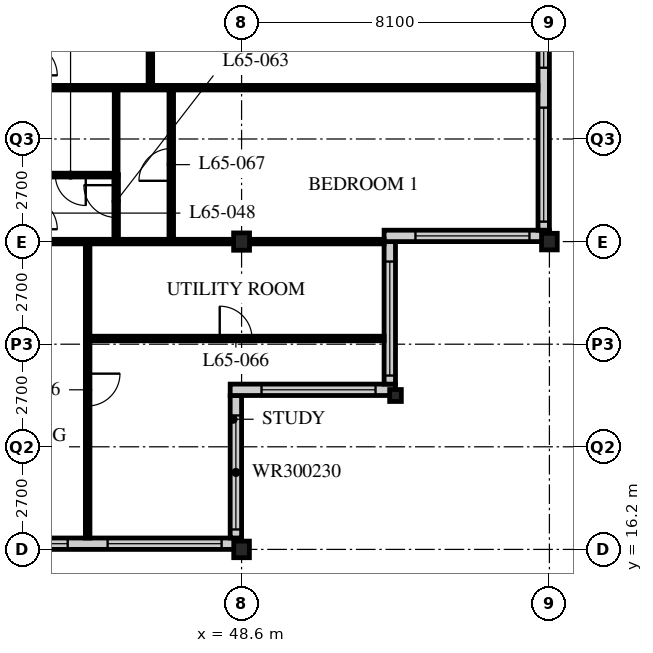
"""IFC4 building model, lengths in metres.
Left out: names, types, materials, properties, quantities, classifications, styles, units other than length and angle.
Written with IfcOpenShell. Run it as: python <this file> out.ifc"""

import sys

from ifc_helpers import new_model, si_unit, direction, frame, frame_2d, origin, origin_2d, place, context, subcontext, project, spatial, rectangle, i_section, extrude, element, fill, save


model = new_model("IFC4")
c1 = context("Model", 3, precision=1e-05, world=origin(), true_north=direction((0.0, 1.0)))
c2 = subcontext(c1, "Body", "Model", "MODEL_VIEW")
j1 = project(units=[si_unit("LENGTHUNIT", "METRE"), si_unit("PLANEANGLEUNIT", "RADIAN")], contexts=[c1])
p1 = place(None, origin())
s1 = spatial("IfcSite", under=j1, at=p1, CompositionType="ELEMENT")
p2 = place(p1, origin())
s2 = spatial("IfcBuilding", under=s1, at=p2, CompositionType="ELEMENT")
p3 = place(p2, frame((0.0, 0.0, 254.1)))
s3 = spatial("IfcBuildingStorey", under=s2, at=p3, CompositionType="ELEMENT", Elevation=254.1)
p4 = place(p3, frame((48.6, 16.2, 0.0), z_axis=(0.0, 0.0, 1.0), x_axis=(1.0, 0.0, 0.0)))
e1 = element("IfcColumn", 1, at=p4, inside=s3, PredefinedType="COLUMN", context=c2, shape_type="SweptSolid", body=[
    extrude(i_section(OverallWidth=0.412, OverallDepth=0.437, WebThickness=0.036, FlangeThickness=0.058, FilletRadius=0.015, at=origin_2d()), origin(), (0.0, 0.0, 1.0), 3.9),
])
p5 = place(p3, frame((48.6, 24.3, 0.0), z_axis=(0.0, 0.0, 1.0), x_axis=(1.0, 0.0, 0.0)))
e2 = element("IfcColumn", 2, at=p5, inside=s3, PredefinedType="COLUMN", context=c2, shape_type="SweptSolid", body=[
    extrude(i_section(OverallWidth=0.418, OverallDepth=0.456, WebThickness=0.042, FlangeThickness=0.067, FilletRadius=0.015, at=origin_2d()), origin(), (0.0, 0.0, 1.0), 3.9),
])
p6 = place(p3, frame((52.65, 20.25, 0.0), z_axis=(0.0, 0.0, 1.0), x_axis=(1.0, 0.0, 0.0)))
e3 = element("IfcColumn", 3, at=p6, inside=s3, PredefinedType="COLUMN", context=c2, shape_type="SweptSolid", body=[
    extrude(i_section(OverallWidth=0.307, OverallDepth=0.314, WebThickness=0.012, FlangeThickness=0.019, FilletRadius=0.015, at=origin_2d()), origin(), (0.0, 0.0, 1.0), 3.9),
])
p7 = place(p3, frame((56.7, 24.3, 0.0), z_axis=(0.0, 0.0, 1.0), x_axis=(1.0, 0.0, 0.0)))
e4 = element("IfcColumn", 4, at=p7, inside=s3, PredefinedType="COLUMN", context=c2, shape_type="SweptSolid", body=[
    extrude(i_section(OverallWidth=0.412, OverallDepth=0.437, WebThickness=0.036, FlangeThickness=0.058, FilletRadius=0.015, at=origin_2d()), origin(), (0.0, 0.0, 1.0), 3.9),
])
p8 = place(p3, frame((8.4, 16.35, 0.0), z_axis=(0.0, 0.0, 1.0), x_axis=(1.0, 0.0, 0.0)))
e5 = element("IfcWall", 5, at=p8, inside=s3, PredefinedType="SOLIDWALL", context=c2, shape_type="SweptSolid", body=[
    extrude(rectangle(XDim=40.2, YDim=0.3, at=frame_2d((20.1, 0.0))), origin(), (0.0, 0.0, 1.0), 3.69),
])
p9 = place(p8, frame((0.225, 0.0, 0.6)))
e6 = element("IfcOpeningElement", 6, at=p9, cuts=e5, PredefinedType="OPENING", context=c2, shape_type="SweptSolid", body=[
    extrude(rectangle(XDim=3.0, YDim=2.4, at=frame_2d((1.5, 1.2))), frame((0.0, 0.16, 0.0), z_axis=(0.0, -1.0, 0.0), x_axis=(1.0, 0.0, 0.0)), (0.0, 0.0, 1.0), 0.32),
])
p10 = place(p8, frame((4.275, 0.0, 0.6)))
e7 = element("IfcOpeningElement", 7, at=p10, cuts=e5, PredefinedType="OPENING", context=c2, shape_type="SweptSolid", body=[
    extrude(rectangle(XDim=3.0, YDim=2.4, at=frame_2d((1.5, 1.2))), frame((0.0, 0.16, 0.0), z_axis=(0.0, -1.0, 0.0), x_axis=(1.0, 0.0, 0.0)), (0.0, 0.0, 1.0), 0.32),
])
p11 = place(p8, frame((8.325, 0.0, 0.6)))
e8 = element("IfcOpeningElement", 8, at=p11, cuts=e5, PredefinedType="OPENING", context=c2, shape_type="SweptSolid", body=[
    extrude(rectangle(XDim=3.0, YDim=2.4, at=frame_2d((1.5, 1.2))), frame((0.0, 0.16, 0.0), z_axis=(0.0, -1.0, 0.0), x_axis=(1.0, 0.0, 0.0)), (0.0, 0.0, 1.0), 0.32),
])
p12 = place(p8, frame((12.375, 0.0, 0.6)))
e9 = element("IfcOpeningElement", 9, at=p12, cuts=e5, PredefinedType="OPENING", context=c2, shape_type="SweptSolid", body=[
    extrude(rectangle(XDim=3.0, YDim=2.4, at=frame_2d((1.5, 1.2))), frame((0.0, 0.16, 0.0), z_axis=(0.0, -1.0, 0.0), x_axis=(1.0, 0.0, 0.0)), (0.0, 0.0, 1.0), 0.32),
])
p13 = place(p8, frame((16.425, 0.0, 0.6)))
e10 = element("IfcOpeningElement", 10, at=p13, cuts=e5, PredefinedType="OPENING", context=c2, shape_type="SweptSolid", body=[
    extrude(rectangle(XDim=3.0, YDim=2.4, at=frame_2d((1.5, 1.2))), frame((0.0, 0.16, 0.0), z_axis=(0.0, -1.0, 0.0), x_axis=(1.0, 0.0, 0.0)), (0.0, 0.0, 1.0), 0.32),
])
p14 = place(p8, frame((20.475, 0.0, 0.6)))
e11 = element("IfcOpeningElement", 11, at=p14, cuts=e5, PredefinedType="OPENING", context=c2, shape_type="SweptSolid", body=[
    extrude(rectangle(XDim=3.0, YDim=2.4, at=frame_2d((1.5, 1.2))), frame((0.0, 0.16, 0.0), z_axis=(0.0, -1.0, 0.0), x_axis=(1.0, 0.0, 0.0)), (0.0, 0.0, 1.0), 0.32),
])
p15 = place(p8, frame((24.525, 0.0, 0.6)))
e12 = element("IfcOpeningElement", 12, at=p15, cuts=e5, PredefinedType="OPENING", context=c2, shape_type="SweptSolid", body=[
    extrude(rectangle(XDim=3.0, YDim=2.4, at=frame_2d((1.5, 1.2))), frame((0.0, 0.16, 0.0), z_axis=(0.0, -1.0, 0.0), x_axis=(1.0, 0.0, 0.0)), (0.0, 0.0, 1.0), 0.32),
])
p16 = place(p8, frame((28.575, 0.0, 0.6)))
e13 = element("IfcOpeningElement", 13, at=p16, cuts=e5, PredefinedType="OPENING", context=c2, shape_type="SweptSolid", body=[
    extrude(rectangle(XDim=3.0, YDim=2.4, at=frame_2d((1.5, 1.2))), frame((0.0, 0.16, 0.0), z_axis=(0.0, -1.0, 0.0), x_axis=(1.0, 0.0, 0.0)), (0.0, 0.0, 1.0), 0.32),
])
p17 = place(p8, frame((32.625, 0.0, 0.6)))
e14 = element("IfcOpeningElement", 14, at=p17, cuts=e5, PredefinedType="OPENING", context=c2, shape_type="SweptSolid", body=[
    extrude(rectangle(XDim=3.0, YDim=2.4, at=frame_2d((1.5, 1.2))), frame((0.0, 0.16, 0.0), z_axis=(0.0, -1.0, 0.0), x_axis=(1.0, 0.0, 0.0)), (0.0, 0.0, 1.0), 0.32),
])
p18 = place(p8, frame((36.675, 0.0, 0.6)))
e15 = element("IfcOpeningElement", 15, at=p18, cuts=e5, PredefinedType="OPENING", context=c2, shape_type="SweptSolid", body=[
    extrude(rectangle(XDim=3.0, YDim=2.4, at=frame_2d((1.5, 1.2))), frame((0.0, 0.16, 0.0), z_axis=(0.0, -1.0, 0.0), x_axis=(1.0, 0.0, 0.0)), (0.0, 0.0, 1.0), 0.32),
])
p19 = place(p3, frame((48.45, 16.5, 0.0), z_axis=(0.0, 0.0, 1.0), x_axis=(0.0, 1.0, 0.0)))
e16 = element("IfcWall", 16, at=p19, inside=s3, PredefinedType="SOLIDWALL", context=c2, shape_type="SweptSolid", body=[
    extrude(rectangle(XDim=3.75, YDim=0.3, at=frame_2d((1.875, 0.0))), origin(), (0.0, 0.0, 1.0), 3.69),
])
p20 = place(p19, frame((0.225, 0.0, 0.6)))
e17 = element("IfcOpeningElement", 17, at=p20, cuts=e16, PredefinedType="OPENING", context=c2, shape_type="SweptSolid", body=[
    extrude(rectangle(XDim=3.0, YDim=2.3, at=frame_2d((1.5, 1.15))), frame((0.0, 0.16, 0.0), z_axis=(0.0, -1.0, 0.0), x_axis=(1.0, 0.0, 0.0)), (0.0, 0.0, 1.0), 0.32),
])
p21 = place(p3, frame((48.3, 20.4, 0.0), z_axis=(0.0, 0.0, 1.0), x_axis=(1.0, 0.0, 0.0)))
e18 = element("IfcWall", 18, at=p21, inside=s3, PredefinedType="SOLIDWALL", context=c2, shape_type="SweptSolid", body=[
    extrude(rectangle(XDim=4.35, YDim=0.3, at=frame_2d((2.175, 0.0))), origin(), (0.0, 0.0, 1.0), 3.69),
])
p22 = place(p21, frame((0.825, 0.0, 0.6)))
e19 = element("IfcOpeningElement", 19, at=p22, cuts=e18, PredefinedType="OPENING", context=c2, shape_type="SweptSolid", body=[
    extrude(rectangle(XDim=3.0, YDim=2.3, at=frame_2d((1.5, 1.15))), frame((0.0, 0.16, 0.0), z_axis=(0.0, -1.0, 0.0), x_axis=(1.0, 0.0, 0.0)), (0.0, 0.0, 1.0), 0.32),
])
p23 = place(p3, frame((52.5, 20.55, 0.0), z_axis=(0.0, 0.0, 1.0), x_axis=(0.0, 1.0, 0.0)))
e20 = element("IfcWall", 20, at=p23, inside=s3, PredefinedType="SOLIDWALL", context=c2, shape_type="SweptSolid", body=[
    extrude(rectangle(XDim=3.75, YDim=0.3, at=frame_2d((1.875, 0.0))), origin(), (0.0, 0.0, 1.0), 3.69),
])
p24 = place(p23, frame((0.225, 0.0, 0.6)))
e21 = element("IfcOpeningElement", 21, at=p24, cuts=e20, PredefinedType="OPENING", context=c2, shape_type="SweptSolid", body=[
    extrude(rectangle(XDim=3.0, YDim=2.3, at=frame_2d((1.5, 1.15))), frame((0.0, 0.16, 0.0), z_axis=(0.0, -1.0, 0.0), x_axis=(1.0, 0.0, 0.0)), (0.0, 0.0, 1.0), 0.32),
])
p25 = place(p3, frame((52.35, 24.45, 0.0), z_axis=(0.0, 0.0, 1.0), x_axis=(1.0, 0.0, 0.0)))
e22 = element("IfcWall", 22, at=p25, inside=s3, PredefinedType="SOLIDWALL", context=c2, shape_type="SweptSolid", body=[
    extrude(rectangle(XDim=4.35, YDim=0.3, at=frame_2d((2.175, 0.0))), origin(), (0.0, 0.0, 1.0), 3.69),
])
p26 = place(p25, frame((0.825, 0.0, 0.6)))
e23 = element("IfcOpeningElement", 23, at=p26, cuts=e22, PredefinedType="OPENING", context=c2, shape_type="SweptSolid", body=[
    extrude(rectangle(XDim=3.0, YDim=2.3, at=frame_2d((1.5, 1.15))), frame((0.0, 0.16, 0.0), z_axis=(0.0, -1.0, 0.0), x_axis=(1.0, 0.0, 0.0)), (0.0, 0.0, 1.0), 0.32),
])
p27 = place(p3, frame((56.55, 24.6, 0.0), z_axis=(0.0, 0.0, 1.0), x_axis=(0.0, 1.0, 0.0)))
e24 = element("IfcWall", 24, at=p27, inside=s3, PredefinedType="SOLIDWALL", context=c2, shape_type="SweptSolid", body=[
    extrude(rectangle(XDim=32.1, YDim=0.3, at=frame_2d((16.05, 0.0))), origin(), (0.0, 0.0, 1.0), 3.69),
])
p28 = place(p27, frame((0.225, 0.0, 0.6)))
e25 = element("IfcOpeningElement", 25, at=p28, cuts=e24, PredefinedType="OPENING", context=c2, shape_type="SweptSolid", body=[
    extrude(rectangle(XDim=3.0, YDim=2.4, at=frame_2d((1.5, 1.2))), frame((0.0, 0.16, 0.0), z_axis=(0.0, -1.0, 0.0), x_axis=(1.0, 0.0, 0.0)), (0.0, 0.0, 1.0), 0.32),
])
p29 = place(p27, frame((4.275, 0.0, 0.6)))
e26 = element("IfcOpeningElement", 26, at=p29, cuts=e24, PredefinedType="OPENING", context=c2, shape_type="SweptSolid", body=[
    extrude(rectangle(XDim=3.0, YDim=2.4, at=frame_2d((1.5, 1.2))), frame((0.0, 0.16, 0.0), z_axis=(0.0, -1.0, 0.0), x_axis=(1.0, 0.0, 0.0)), (0.0, 0.0, 1.0), 0.32),
])
p30 = place(p27, frame((8.325, 0.0, 0.6)))
e27 = element("IfcOpeningElement", 27, at=p30, cuts=e24, PredefinedType="OPENING", context=c2, shape_type="SweptSolid", body=[
    extrude(rectangle(XDim=3.0, YDim=2.4, at=frame_2d((1.5, 1.2))), frame((0.0, 0.16, 0.0), z_axis=(0.0, -1.0, 0.0), x_axis=(1.0, 0.0, 0.0)), (0.0, 0.0, 1.0), 0.32),
])
p31 = place(p27, frame((12.375, 0.0, 0.6)))
e28 = element("IfcOpeningElement", 28, at=p31, cuts=e24, PredefinedType="OPENING", context=c2, shape_type="SweptSolid", body=[
    extrude(rectangle(XDim=3.0, YDim=2.4, at=frame_2d((1.5, 1.2))), frame((0.0, 0.16, 0.0), z_axis=(0.0, -1.0, 0.0), x_axis=(1.0, 0.0, 0.0)), (0.0, 0.0, 1.0), 0.32),
])
p32 = place(p27, frame((16.425, 0.0, 0.6)))
e29 = element("IfcOpeningElement", 29, at=p32, cuts=e24, PredefinedType="OPENING", context=c2, shape_type="SweptSolid", body=[
    extrude(rectangle(XDim=3.0, YDim=2.4, at=frame_2d((1.5, 1.2))), frame((0.0, 0.16, 0.0), z_axis=(0.0, -1.0, 0.0), x_axis=(1.0, 0.0, 0.0)), (0.0, 0.0, 1.0), 0.32),
])
p33 = place(p27, frame((20.475, 0.0, 0.6)))
e30 = element("IfcOpeningElement", 30, at=p33, cuts=e24, PredefinedType="OPENING", context=c2, shape_type="SweptSolid", body=[
    extrude(rectangle(XDim=3.0, YDim=2.4, at=frame_2d((1.5, 1.2))), frame((0.0, 0.16, 0.0), z_axis=(0.0, -1.0, 0.0), x_axis=(1.0, 0.0, 0.0)), (0.0, 0.0, 1.0), 0.32),
])
p34 = place(p27, frame((24.525, 0.0, 0.6)))
e31 = element("IfcOpeningElement", 31, at=p34, cuts=e24, PredefinedType="OPENING", context=c2, shape_type="SweptSolid", body=[
    extrude(rectangle(XDim=3.0, YDim=2.4, at=frame_2d((1.5, 1.2))), frame((0.0, 0.16, 0.0), z_axis=(0.0, -1.0, 0.0), x_axis=(1.0, 0.0, 0.0)), (0.0, 0.0, 1.0), 0.32),
])
p35 = place(p27, frame((28.575, 0.0, 0.6)))
e32 = element("IfcOpeningElement", 32, at=p35, cuts=e24, PredefinedType="OPENING", context=c2, shape_type="SweptSolid", body=[
    extrude(rectangle(XDim=3.0, YDim=2.4, at=frame_2d((1.5, 1.2))), frame((0.0, 0.16, 0.0), z_axis=(0.0, -1.0, 0.0), x_axis=(1.0, 0.0, 0.0)), (0.0, 0.0, 1.0), 0.32),
])
p36 = place(p3, frame((42.9, 24.3, 0.0), z_axis=(0.0, 0.0, 1.0), x_axis=(1.0, 0.0, 0.0)))
e33 = element("IfcWall", 33, at=p36, inside=s3, PredefinedType="PARTITIONING", context=c2, shape_type="SweptSolid", body=[
    extrude(rectangle(XDim=9.45, YDim=0.12, at=frame_2d((4.725, 0.0))), origin(), (0.0, 0.0, 1.0), 3.078),
])
p37 = place(p3, frame((44.55, 16.5, 0.0), z_axis=(0.0, 0.0, 1.0), x_axis=(0.0, 1.0, 0.0)))
e34 = element("IfcWall", 34, at=p37, inside=s3, PredefinedType="PARTITIONING", context=c2, shape_type="SweptSolid", body=[
    extrude(rectangle(XDim=7.8, YDim=0.12, at=frame_2d((3.9, 0.0))), origin(), (0.0, 0.0, 1.0), 3.69),
])
p38 = place(p37, frame((3.475, 0.0, 0.0)))
e35 = element("IfcOpeningElement", 35, at=p38, cuts=e34, PredefinedType="OPENING", context=c2, shape_type="SweptSolid", body=[
    extrude(rectangle(XDim=0.85, YDim=2.1, at=frame_2d((0.425, 1.05))), frame((0.0, 0.07, 0.0), z_axis=(0.0, -1.0, 0.0), x_axis=(1.0, 0.0, 0.0)), (0.0, 0.0, 1.0), 0.14),
])
p39 = place(p3, frame((42.9, 26.05, 0.0), z_axis=(0.0, 0.0, 1.0), x_axis=(1.0, 0.0, 0.0)))
e36 = element("IfcWall", 36, at=p39, inside=s3, PredefinedType="PARTITIONING", context=c2, shape_type="SweptSolid", body=[
    extrude(rectangle(XDim=2.4, YDim=0.1, at=frame_2d((1.2, 0.0))), origin(), (0.0, 0.0, 1.0), 3.69),
])
p40 = place(p39, frame((0.8, 0.0, 0.0)))
e37 = element("IfcOpeningElement", 37, at=p40, cuts=e36, PredefinedType="OPENING", context=c2, shape_type="SweptSolid", body=[
    extrude(rectangle(XDim=0.8, YDim=2.1, at=frame_2d((0.4, 1.05))), frame((0.0, 0.06, 0.0), z_axis=(0.0, -1.0, 0.0), x_axis=(1.0, 0.0, 0.0)), (0.0, 0.0, 1.0), 0.12),
])
p41 = place(p3, frame((45.3, 26.05, 0.0), z_axis=(0.0, 0.0, 1.0), x_axis=(0.0, 1.0, 0.0)))
e38 = element("IfcWall", 38, at=p41, inside=s3, PredefinedType="PARTITIONING", context=c2, shape_type="SweptSolid", body=[
    extrude(rectangle(XDim=2.3, YDim=0.1, at=frame_2d((1.15, 0.0))), origin(), (0.0, 0.0, 1.0), 3.69),
])
p42 = place(p3, frame((42.9, 28.35, 0.0), z_axis=(0.0, 0.0, 1.0), x_axis=(1.0, 0.0, 0.0)))
e39 = element("IfcWall", 39, at=p42, inside=s3, PredefinedType="PARTITIONING", context=c2, shape_type="SweptSolid", body=[
    extrude(rectangle(XDim=13.5, YDim=0.12, at=frame_2d((6.75, 0.0))), origin(), (0.0, 0.0, 1.0), 3.69),
])
p43 = place(p3, frame((45.3, 24.3, 0.0), z_axis=(0.0, 0.0, 1.0), x_axis=(0.0, 1.0, 0.0)))
e40 = element("IfcWall", 40, at=p43, inside=s3, PredefinedType="PARTITIONING", context=c2, shape_type="SweptSolid", body=[
    extrude(rectangle(XDim=1.76, YDim=0.12, at=frame_2d((0.88, 0.0))), origin(), (0.0, 0.0, 1.0), 3.69),
])
p44 = place(p43, frame((0.635, 0.0, 0.0)))
e41 = element("IfcOpeningElement", 41, at=p44, cuts=e40, PredefinedType="OPENING", context=c2, shape_type="SweptSolid", body=[
    extrude(rectangle(XDim=0.85, YDim=2.1, at=frame_2d((0.425, 1.05))), frame((0.0, 0.07, 0.0), z_axis=(0.0, -1.0, 0.0), x_axis=(1.0, 0.0, 0.0)), (0.0, 0.0, 1.0), 0.14),
])
p45 = place(p3, frame((44.55, 21.75, 0.0), z_axis=(0.0, 0.0, 1.0), x_axis=(1.0, 0.0, 0.0)))
e42 = element("IfcWall", 42, at=p45, inside=s3, PredefinedType="PARTITIONING", context=c2, shape_type="SweptSolid", body=[
    extrude(rectangle(XDim=7.8, YDim=0.12, at=frame_2d((3.9, 0.0))), origin(), (0.0, 0.0, 1.0), 3.69),
])
p46 = place(p45, frame((3.475, 0.0, 0.0)))
e43 = element("IfcOpeningElement", 43, at=p46, cuts=e42, PredefinedType="OPENING", context=c2, shape_type="SweptSolid", body=[
    extrude(rectangle(XDim=0.85, YDim=2.1, at=frame_2d((0.425, 1.05))), frame((0.0, 0.07, 0.0), z_axis=(0.0, -1.0, 0.0), x_axis=(1.0, 0.0, 0.0)), (0.0, 0.0, 1.0), 0.14),
])
p47 = place(p3, frame((46.75, 24.3, 0.0), z_axis=(0.0, 0.0, 1.0), x_axis=(0.0, 1.0, 0.0)))
e44 = element("IfcWall", 44, at=p47, inside=s3, PredefinedType="PARTITIONING", context=c2, shape_type="SweptSolid", body=[
    extrude(rectangle(XDim=4.05, YDim=0.12, at=frame_2d((2.025, 0.0))), origin(), (0.0, 0.0, 1.0), 3.69),
])
p48 = place(p47, frame((1.6, 0.0, 0.0)))
e45 = element("IfcOpeningElement", 45, at=p48, cuts=e44, PredefinedType="OPENING", context=c2, shape_type="SweptSolid", body=[
    extrude(rectangle(XDim=0.85, YDim=2.1, at=frame_2d((0.425, 1.05))), frame((0.0, 0.07, 0.0), z_axis=(0.0, -1.0, 0.0), x_axis=(1.0, 0.0, 0.0)), (0.0, 0.0, 1.0), 0.14),
])
p49 = place(p3, frame((46.2, 28.35, 0.0), z_axis=(0.0, 0.0, 1.0), x_axis=(0.0, 1.0, 0.0)))
e46 = element("IfcWall", 46, at=p49, inside=s3, PredefinedType="PARTITIONING", context=c2, shape_type="SweptSolid", body=[
    extrude(rectangle(XDim=16.2, YDim=0.12, at=frame_2d((8.1, 0.0))), origin(), (0.0, 0.0, 1.0), 3.69),
])
p50 = place(p49, frame((1.6, 0.0, 0.0)))
e47 = element("IfcOpeningElement", 47, at=p50, cuts=e46, PredefinedType="OPENING", context=c2, shape_type="SweptSolid", body=[
    extrude(rectangle(XDim=0.85, YDim=2.1, at=frame_2d((0.425, 1.05))), frame((0.0, 0.07, 0.0), z_axis=(0.0, -1.0, 0.0), x_axis=(1.0, 0.0, 0.0)), (0.0, 0.0, 1.0), 0.14),
])
p51 = place(p49, frame((5.65, 0.0, 0.0)))
e48 = element("IfcOpeningElement", 48, at=p51, cuts=e46, PredefinedType="OPENING", context=c2, shape_type="SweptSolid", body=[
    extrude(rectangle(XDim=0.85, YDim=2.1, at=frame_2d((0.425, 1.05))), frame((0.0, 0.07, 0.0), z_axis=(0.0, -1.0, 0.0), x_axis=(1.0, 0.0, 0.0)), (0.0, 0.0, 1.0), 0.14),
])
p52 = place(p49, frame((13.75, 0.0, 0.0)))
e49 = element("IfcOpeningElement", 49, at=p52, cuts=e46, PredefinedType="OPENING", context=c2, shape_type="SweptSolid", body=[
    extrude(rectangle(XDim=0.85, YDim=2.1, at=frame_2d((0.425, 1.05))), frame((0.0, 0.07, 0.0), z_axis=(0.0, -1.0, 0.0), x_axis=(1.0, 0.0, 0.0)), (0.0, 0.0, 1.0), 0.14),
])
p53 = place(p49, frame((9.7, 0.0, 0.0)))
e50 = element("IfcOpeningElement", 50, at=p53, cuts=e46, PredefinedType="OPENING", context=c2, shape_type="SweptSolid", body=[
    extrude(rectangle(XDim=0.85, YDim=2.1, at=frame_2d((0.425, 1.05))), frame((0.0, 0.07, 0.0), z_axis=(0.0, -1.0, 0.0), x_axis=(1.0, 0.0, 0.0)), (0.0, 0.0, 1.0), 0.14),
])
p54 = place(p17, origin())
e51 = element("IfcWindow", 51, at=p54, inside=s3, PartitioningType="SINGLE_PANEL", PredefinedType="WINDOW", context=c2, shape_type="SweptSolid", body=[
    extrude(rectangle(XDim=3.0, YDim=2.4, at=frame_2d((1.5, 1.2))), frame((0.0, 0.03, 0.0), z_axis=(0.0, -1.0, 0.0), x_axis=(1.0, 0.0, 0.0)), (0.0, 0.0, 1.0), 0.06),
])
fill(e14, e51)
p55 = place(p18, origin())
e52 = element("IfcWindow", 52, at=p55, inside=s3, PartitioningType="SINGLE_PANEL", PredefinedType="WINDOW", context=c2, shape_type="SweptSolid", body=[
    extrude(rectangle(XDim=3.0, YDim=2.4, at=frame_2d((1.5, 1.2))), frame((0.0, 0.03, 0.0), z_axis=(0.0, -1.0, 0.0), x_axis=(1.0, 0.0, 0.0)), (0.0, 0.0, 1.0), 0.06),
])
fill(e15, e52)
p56 = place(p20, origin())
e53 = element("IfcWindow", 53, at=p56, inside=s3, PartitioningType="SINGLE_PANEL", PredefinedType="WINDOW", context=c2, shape_type="SweptSolid", body=[
    extrude(rectangle(XDim=3.0, YDim=2.3, at=frame_2d((1.5, 1.15))), frame((0.0, 0.03, 0.0), z_axis=(0.0, -1.0, 0.0), x_axis=(1.0, 0.0, 0.0)), (0.0, 0.0, 1.0), 0.06),
])
fill(e17, e53)
p57 = place(p22, origin())
e54 = element("IfcWindow", 54, at=p57, inside=s3, PartitioningType="SINGLE_PANEL", PredefinedType="WINDOW", context=c2, shape_type="SweptSolid", body=[
    extrude(rectangle(XDim=3.0, YDim=2.3, at=frame_2d((1.5, 1.15))), frame((0.0, 0.03, 0.0), z_axis=(0.0, -1.0, 0.0), x_axis=(1.0, 0.0, 0.0)), (0.0, 0.0, 1.0), 0.06),
])
fill(e19, e54)
p58 = place(p24, origin())
e55 = element("IfcWindow", 55, at=p58, inside=s3, PartitioningType="SINGLE_PANEL", PredefinedType="WINDOW", context=c2, shape_type="SweptSolid", body=[
    extrude(rectangle(XDim=3.0, YDim=2.3, at=frame_2d((1.5, 1.15))), frame((0.0, 0.03, 0.0), z_axis=(0.0, -1.0, 0.0), x_axis=(1.0, 0.0, 0.0)), (0.0, 0.0, 1.0), 0.06),
])
fill(e21, e55)
p59 = place(p26, origin())
e56 = element("IfcWindow", 56, at=p59, inside=s3, PartitioningType="SINGLE_PANEL", PredefinedType="WINDOW", context=c2, shape_type="SweptSolid", body=[
    extrude(rectangle(XDim=3.0, YDim=2.3, at=frame_2d((1.5, 1.15))), frame((0.0, 0.03, 0.0), z_axis=(0.0, -1.0, 0.0), x_axis=(1.0, 0.0, 0.0)), (0.0, 0.0, 1.0), 0.06),
])
fill(e23, e56)
p60 = place(p28, origin())
e57 = element("IfcWindow", 57, at=p60, inside=s3, PartitioningType="SINGLE_PANEL", PredefinedType="WINDOW", context=c2, shape_type="SweptSolid", body=[
    extrude(rectangle(XDim=3.0, YDim=2.4, at=frame_2d((1.5, 1.2))), frame((0.0, 0.03, 0.0), z_axis=(0.0, -1.0, 0.0), x_axis=(1.0, 0.0, 0.0)), (0.0, 0.0, 1.0), 0.06),
])
fill(e25, e57)
p61 = place(p29, origin())
e58 = element("IfcWindow", 58, at=p61, inside=s3, PartitioningType="SINGLE_PANEL", PredefinedType="WINDOW", context=c2, shape_type="SweptSolid", body=[
    extrude(rectangle(XDim=3.0, YDim=2.4, at=frame_2d((1.5, 1.2))), frame((0.0, 0.03, 0.0), z_axis=(0.0, -1.0, 0.0), x_axis=(1.0, 0.0, 0.0)), (0.0, 0.0, 1.0), 0.06),
])
fill(e26, e58)
p62 = place(p38, origin())
e59 = element("IfcDoor", 59, at=p62, inside=s3, OperationType="SINGLE_SWING_LEFT", PredefinedType="DOOR", context=c2, shape_type="SweptSolid", body=[
    extrude(rectangle(XDim=0.85, YDim=2.1, at=frame_2d((0.425, 1.05))), frame((0.0, 0.025, 0.0), z_axis=(0.0, -1.0, 0.0), x_axis=(1.0, 0.0, 0.0)), (0.0, 0.0, 1.0), 0.05),
])
fill(e35, e59)
p63 = place(p40, origin())
e60 = element("IfcDoor", 60, at=p63, inside=s3, OperationType="SINGLE_SWING_LEFT", PredefinedType="DOOR", context=c2, shape_type="SweptSolid", body=[
    extrude(rectangle(XDim=0.8, YDim=2.1, at=frame_2d((0.4, 1.05))), frame((0.0, 0.025, 0.0), z_axis=(0.0, -1.0, 0.0), x_axis=(1.0, 0.0, 0.0)), (0.0, 0.0, 1.0), 0.05),
])
fill(e37, e60)
p64 = place(p44, origin())
e61 = element("IfcDoor", 61, at=p64, inside=s3, OperationType="SINGLE_SWING_RIGHT", PredefinedType="DOOR", context=c2, shape_type="SweptSolid", body=[
    extrude(rectangle(XDim=0.85, YDim=2.1, at=frame_2d((0.425, 1.05))), frame((0.0, 0.025, 0.0), z_axis=(0.0, -1.0, 0.0), x_axis=(1.0, 0.0, 0.0)), (0.0, 0.0, 1.0), 0.05),
])
fill(e41, e61)
p65 = place(p46, origin())
e62 = element("IfcDoor", 62, at=p65, inside=s3, OperationType="SINGLE_SWING_LEFT", PredefinedType="DOOR", context=c2, shape_type="SweptSolid", body=[
    extrude(rectangle(XDim=0.85, YDim=2.1, at=frame_2d((0.425, 1.05))), frame((0.0, 0.025, 0.0), z_axis=(0.0, -1.0, 0.0), x_axis=(1.0, 0.0, 0.0)), (0.0, 0.0, 1.0), 0.05),
])
fill(e43, e62)
p66 = place(p48, origin())
e63 = element("IfcDoor", 63, at=p66, inside=s3, OperationType="SINGLE_SWING_LEFT", PredefinedType="DOOR", context=c2, shape_type="SweptSolid", body=[
    extrude(rectangle(XDim=0.85, YDim=2.1, at=frame_2d((0.425, 1.05))), frame((0.0, 0.025, 0.0), z_axis=(0.0, -1.0, 0.0), x_axis=(1.0, 0.0, 0.0)), (0.0, 0.0, 1.0), 0.05),
])
fill(e45, e63)
save(model, sys.argv[1])
